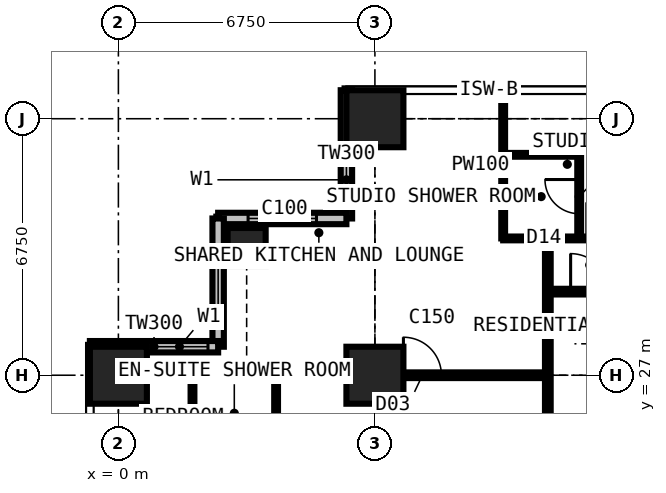
"""IFC4 building model, lengths in metres.
Left out: names, types, materials, properties, quantities, classifications, styles, units other than length and angle.
Written with IfcOpenShell. Run it as: python <this file> out.ifc"""

import sys

from ifc_helpers import new_model, si_unit, direction, frame, frame_2d, origin, origin_2d, place, context, subcontext, project, spatial, rectangle, extrude, element, fill, save


model = new_model("IFC4")
c1 = context("Model", 3, precision=1e-05, world=origin(), true_north=direction((0.0, 1.0)))
c2 = subcontext(c1, "Body", "Model", "MODEL_VIEW")
j1 = project(units=[si_unit("LENGTHUNIT", "METRE"), si_unit("PLANEANGLEUNIT", "RADIAN")], contexts=[c1])
p1 = place(None, origin())
s1 = spatial("IfcSite", under=j1, at=p1, CompositionType="ELEMENT")
p2 = place(p1, origin())
s2 = spatial("IfcBuilding", under=s1, at=p2, CompositionType="ELEMENT")
p3 = place(p2, frame((0.0, 0.0, 116.1)))
s3 = spatial("IfcBuildingStorey", under=s2, at=p3, CompositionType="ELEMENT", Elevation=116.1)
p4 = place(p3, frame((0.0, 27.0, 0.0), z_axis=(0.0, 0.0, 1.0), x_axis=(1.0, 0.0, 0.0)))
e1 = element("IfcColumn", 1, at=p4, inside=s3, PredefinedType="COLUMN", context=c2, shape_type="SweptSolid", body=[
    extrude(rectangle(XDim=1.5, YDim=1.5, at=origin_2d()), origin(), (0.0, 0.0, 1.0), 3.6),
])
p5 = place(p3, frame((3.375, 30.375, 0.0), z_axis=(0.0, 0.0, 1.0), x_axis=(1.0, 0.0, 0.0)))
e2 = element("IfcColumn", 2, at=p5, inside=s3, PredefinedType="COLUMN", context=c2, shape_type="SweptSolid", body=[
    extrude(rectangle(XDim=1.0, YDim=1.0, at=origin_2d()), origin(), (0.0, 0.0, 1.0), 3.6),
])
for number, where, z_axis, x_axis in (
    (3, (6.75, 27.0, 0.0), (0.0, 0.0, 1.0), (1.0, 0.0, 0.0)),
    (4, (6.75, 33.75, 0.0), (0.0, 0.0, 1.0), (1.0, 0.0, 0.0)),
):
    element("IfcColumn", number, at=place(p3, frame(where, z_axis=z_axis, x_axis=x_axis)), inside=s3, PredefinedType="COLUMN", context=c2, shape_type="SweptSolid", body=[
        extrude(rectangle(XDim=1.5, YDim=1.5, at=origin_2d()), origin(), (0.0, 0.0, 1.0), 3.6),
    ])
p6 = place(p3, frame((6.0, 34.5, 0.0), z_axis=(0.0, 0.0, 1.0), x_axis=(0.0, -1.0, 0.0)))
e5 = element("IfcWall", 5, at=p6, inside=s3, PredefinedType="SOLIDWALL", context=c2, shape_type="SweptSolid", body=[
    extrude(rectangle(XDim=3.375, YDim=0.3, at=frame_2d((1.688, 0.0))), origin(), (0.0, 0.0, 1.0), 3.375),
])
p7 = place(p6, frame((1.607, 0.0, 0.9)))
e6 = element("IfcOpeningElement", 6, at=p7, cuts=e5, PredefinedType="OPENING", context=c2, shape_type="SweptSolid", body=[
    extrude(rectangle(XDim=1.5, YDim=1.8, at=frame_2d((0.75, 0.9))), frame((0.0, 0.16, 0.0), z_axis=(0.0, -1.0, 0.0), x_axis=(1.0, 0.0, 0.0)), (0.0, 0.0, 1.0), 0.32),
])
p8 = place(p3, frame((6.0, 31.125, 0.0), z_axis=(0.0, 0.0, 1.0), x_axis=(-1.0, 0.0, 0.0)))
e7 = element("IfcWall", 7, at=p8, inside=s3, PredefinedType="SOLIDWALL", context=c2, shape_type="SweptSolid", body=[
    extrude(rectangle(XDim=3.375, YDim=0.3, at=frame_2d((1.688, 0.0))), origin(), (0.0, 0.0, 1.0), 3.375),
])
p9 = place(p8, frame((0.788, 0.0, 0.6)))
e8 = element("IfcOpeningElement", 8, at=p9, cuts=e7, PredefinedType="OPENING", context=c2, shape_type="SweptSolid", body=[
    extrude(rectangle(XDim=1.8, YDim=2.1, at=frame_2d((0.9, 1.05))), frame((0.0, 0.16, 0.0), z_axis=(0.0, -1.0, 0.0), x_axis=(1.0, 0.0, 0.0)), (0.0, 0.0, 1.0), 0.32),
])
p10 = place(p3, frame((2.625, 31.125, 0.0), z_axis=(0.0, 0.0, 1.0), x_axis=(0.0, -1.0, 0.0)))
e9 = element("IfcWall", 9, at=p10, inside=s3, PredefinedType="SOLIDWALL", context=c2, shape_type="SweptSolid", body=[
    extrude(rectangle(XDim=3.375, YDim=0.3, at=frame_2d((1.688, 0.0))), origin(), (0.0, 0.0, 1.0), 3.375),
])
p11 = place(p10, frame((0.788, 0.0, 0.6)))
e10 = element("IfcOpeningElement", 10, at=p11, cuts=e9, PredefinedType="OPENING", context=c2, shape_type="SweptSolid", body=[
    extrude(rectangle(XDim=1.8, YDim=2.1, at=frame_2d((0.9, 1.05))), frame((0.0, 0.16, 0.0), z_axis=(0.0, -1.0, 0.0), x_axis=(1.0, 0.0, 0.0)), (0.0, 0.0, 1.0), 0.32),
])
p12 = place(p3, frame((2.625, 27.75, 0.0), z_axis=(0.0, 0.0, 1.0), x_axis=(-1.0, 0.0, 0.0)))
e11 = element("IfcWall", 11, at=p12, inside=s3, PredefinedType="SOLIDWALL", context=c2, shape_type="SweptSolid", body=[
    extrude(rectangle(XDim=3.375, YDim=0.3, at=frame_2d((1.688, 0.0))), origin(), (0.0, 0.0, 1.0), 3.375),
])
p13 = place(p12, frame((0.268, 0.0, 0.9)))
e12 = element("IfcOpeningElement", 12, at=p13, cuts=e11, PredefinedType="OPENING", context=c2, shape_type="SweptSolid", body=[
    extrude(rectangle(XDim=1.5, YDim=1.8, at=frame_2d((0.75, 0.9))), frame((0.0, 0.16, 0.0), z_axis=(0.0, -1.0, 0.0), x_axis=(1.0, 0.0, 0.0)), (0.0, 0.0, 1.0), 0.32),
])
p14 = place(p3, frame((-0.734, 27.0, 0.0), z_axis=(0.0, 0.0, 1.0), x_axis=(1.0, 0.0, 0.0)))
e13 = element("IfcWall", 13, at=p14, inside=s3, PredefinedType="PARTITIONING", context=c2, shape_type="SweptSolid", body=[
    extrude(rectangle(XDim=12.034, YDim=0.15, at=frame_2d((6.017, 0.0))), origin(), (0.0, 0.0, 1.0), 2.806),
])
p15 = place(p14, frame((8.234, 0.0, 0.0)))
e14 = element("IfcOpeningElement", 14, at=p15, cuts=e13, PredefinedType="OPENING", context=c2, shape_type="SweptSolid", body=[
    extrude(rectangle(XDim=1.0, YDim=2.2, at=frame_2d((0.5, 1.1))), frame((0.0, 0.085, 0.0), z_axis=(0.0, -1.0, 0.0), x_axis=(1.0, 0.0, 0.0)), (0.0, 0.0, 1.0), 0.17),
])
p16 = place(p3, frame((1.95, 25.0, 0.0), z_axis=(0.0, 0.0, 1.0), x_axis=(0.0, 1.0, 0.0)))
e15 = element("IfcWall", 15, at=p16, inside=s3, PredefinedType="PARTITIONING", context=c2, shape_type="SweptSolid", body=[
    extrude(rectangle(XDim=2.0, YDim=0.1, at=frame_2d((1.0, 0.0))), origin(), (0.0, 0.0, 1.0), 3.375),
])
p17 = place(p3, frame((4.15, 10.125, 0.0), z_axis=(0.0, 0.0, 1.0), x_axis=(0.0, 1.0, 0.0)))
e16 = element("IfcWall", 16, at=p17, inside=s3, PredefinedType="PARTITIONING", context=c2, shape_type="SweptSolid", body=[
    extrude(rectangle(XDim=16.875, YDim=0.1, at=frame_2d((8.438, 0.0))), origin(), (0.0, 0.0, 1.0), 3.375),
])
p18 = place(p17, frame((13.7, 0.0, 0.0)))
e17 = element("IfcOpeningElement", 17, at=p18, cuts=e16, PredefinedType="OPENING", context=c2, shape_type="SweptSolid", body=[
    extrude(rectangle(XDim=0.95, YDim=2.2, at=frame_2d((0.475, 1.1))), frame((0.0, 0.06, 0.0), z_axis=(0.0, -1.0, 0.0), x_axis=(1.0, 0.0, 0.0)), (0.0, 0.0, 1.0), 0.12),
])
p19 = place(p17, frame((4.2, 0.0, 0.0)))
e18 = element("IfcOpeningElement", 18, at=p19, cuts=e16, PredefinedType="OPENING", context=c2, shape_type="SweptSolid", body=[
    extrude(rectangle(XDim=0.95, YDim=2.2, at=frame_2d((0.475, 1.1))), frame((0.0, 0.06, 0.0), z_axis=(0.0, -1.0, 0.0), x_axis=(1.0, 0.0, 0.0)), (0.0, 0.0, 1.0), 0.12),
])
p20 = place(p17, frame((10.95, 0.0, 0.0)))
e19 = element("IfcOpeningElement", 19, at=p20, cuts=e16, PredefinedType="OPENING", context=c2, shape_type="SweptSolid", body=[
    extrude(rectangle(XDim=0.95, YDim=2.2, at=frame_2d((0.475, 1.1))), frame((0.0, 0.06, 0.0), z_axis=(0.0, -1.0, 0.0), x_axis=(1.0, 0.0, 0.0)), (0.0, 0.0, 1.0), 0.12),
])
p21 = place(p3, frame((10.125, 30.6, 0.0), z_axis=(0.0, 0.0, 1.0), x_axis=(0.0, 1.0, 0.0)))
e20 = element("IfcWall", 20, at=p21, inside=s3, PredefinedType="PARTITIONING", context=c2, shape_type="SweptSolid", body=[
    extrude(rectangle(XDim=3.884, YDim=0.1, at=frame_2d((1.942, 0.0))), origin(), (0.0, 0.0, 1.0), 3.375),
])
p22 = place(p3, frame((10.125, 30.6, 0.0), z_axis=(0.0, 0.0, 1.0), x_axis=(1.0, 0.0, 0.0)))
e21 = element("IfcWall", 21, at=p22, inside=s3, PredefinedType="PARTITIONING", context=c2, shape_type="SweptSolid", body=[
    extrude(rectangle(XDim=3.375, YDim=0.1, at=frame_2d((1.688, 0.0))), origin(), (0.0, 0.0, 1.0), 3.375),
])
p23 = place(p22, frame((2.2, 0.0, 0.0)))
e22 = element("IfcOpeningElement", 22, at=p23, cuts=e21, PredefinedType="OPENING", context=c2, shape_type="SweptSolid", body=[
    extrude(rectangle(XDim=0.95, YDim=2.2, at=frame_2d((0.475, 1.1))), frame((0.0, 0.06, 0.0), z_axis=(0.0, -1.0, 0.0), x_axis=(1.0, 0.0, 0.0)), (0.0, 0.0, 1.0), 0.12),
])
p24 = place(p3, frame((10.125, 32.8, 0.0), z_axis=(0.0, 0.0, 1.0), x_axis=(1.0, 0.0, 0.0)))
e23 = element("IfcWall", 23, at=p24, inside=s3, PredefinedType="PARTITIONING", context=c2, shape_type="SweptSolid", body=[
    extrude(rectangle(XDim=2.0, YDim=0.1, at=frame_2d((1.0, 0.0))), origin(), (0.0, 0.0, 1.0), 3.375),
])
p25 = place(p3, frame((11.3, 11.3, 0.0), z_axis=(0.0, 0.0, 1.0), x_axis=(0.0, 1.0, 0.0)))
e24 = element("IfcWall", 24, at=p25, inside=s3, PredefinedType="PARTITIONING", context=c2, shape_type="SweptSolid", body=[
    extrude(rectangle(XDim=19.3, YDim=0.15, at=frame_2d((9.65, 0.0))), origin(), (0.0, 0.0, 1.0), 3.375),
])
p26 = place(p25, frame((13.525, 0.0, 0.0)))
e25 = element("IfcOpeningElement", 25, at=p26, cuts=e24, PredefinedType="OPENING", context=c2, shape_type="SweptSolid", body=[
    extrude(rectangle(XDim=1.0, YDim=2.2, at=frame_2d((0.5, 1.1))), frame((0.0, 0.085, 0.0), z_axis=(0.0, -1.0, 0.0), x_axis=(1.0, 0.0, 0.0)), (0.0, 0.0, 1.0), 0.17),
])
p27 = place(p25, frame((10.438, 0.0, 0.0)))
e26 = element("IfcOpeningElement", 26, at=p27, cuts=e24, PredefinedType="OPENING", context=c2, shape_type="SweptSolid", body=[
    extrude(rectangle(XDim=1.0, YDim=2.2, at=frame_2d((0.5, 1.1))), frame((0.0, 0.085, 0.0), z_axis=(0.0, -1.0, 0.0), x_axis=(1.0, 0.0, 0.0)), (0.0, 0.0, 1.0), 0.17),
])
p28 = place(p3, frame((11.3, 29.2, 0.0), z_axis=(0.0, 0.0, 1.0), x_axis=(1.0, 0.0, 0.0)))
e27 = element("IfcWall", 27, at=p28, inside=s3, PredefinedType="PARTITIONING", context=c2, shape_type="SweptSolid", body=[
    extrude(rectangle(XDim=19.075, YDim=0.15, at=frame_2d((9.538, 0.0))), origin(), (0.0, 0.0, 1.0), 3.375),
])
p29 = place(p28, frame((5.825, 0.0, 0.0)))
e28 = element("IfcOpeningElement", 28, at=p29, cuts=e27, PredefinedType="OPENING", context=c2, shape_type="SweptSolid", body=[
    extrude(rectangle(XDim=0.95, YDim=2.2, at=frame_2d((0.475, 1.1))), frame((0.0, 0.085, 0.0), z_axis=(0.0, -1.0, 0.0), x_axis=(1.0, 0.0, 0.0)), (0.0, 0.0, 1.0), 0.17),
])
p30 = place(p28, frame((9.2, 0.0, 0.0)))
e29 = element("IfcOpeningElement", 29, at=p30, cuts=e27, PredefinedType="OPENING", context=c2, shape_type="SweptSolid", body=[
    extrude(rectangle(XDim=0.95, YDim=2.2, at=frame_2d((0.475, 1.1))), frame((0.0, 0.085, 0.0), z_axis=(0.0, -1.0, 0.0), x_axis=(1.0, 0.0, 0.0)), (0.0, 0.0, 1.0), 0.17),
])
p31 = place(p28, frame((0.6, 0.0, 0.0)))
e30 = element("IfcOpeningElement", 30, at=p31, cuts=e27, PredefinedType="OPENING", context=c2, shape_type="SweptSolid", body=[
    extrude(rectangle(XDim=1.0, YDim=2.2, at=frame_2d((0.5, 1.1))), frame((0.0, 0.085, 0.0), z_axis=(0.0, -1.0, 0.0), x_axis=(1.0, 0.0, 0.0)), (0.0, 0.0, 1.0), 0.17),
])
p32 = place(p3, frame((12.125, 30.6, 0.0), z_axis=(0.0, 0.0, 1.0), x_axis=(0.0, 1.0, 0.0)))
e31 = element("IfcWall", 31, at=p32, inside=s3, PredefinedType="PARTITIONING", context=c2, shape_type="SweptSolid", body=[
    extrude(rectangle(XDim=2.2, YDim=0.1, at=frame_2d((1.1, 0.0))), origin(), (0.0, 0.0, 1.0), 3.375),
])
p33 = place(p32, frame((0.65, 0.0, 0.0)))
e32 = element("IfcOpeningElement", 32, at=p33, cuts=e31, PredefinedType="OPENING", context=c2, shape_type="SweptSolid", body=[
    extrude(rectangle(XDim=0.9, YDim=2.2, at=frame_2d((0.45, 1.1))), frame((0.0, 0.06, 0.0), z_axis=(0.0, -1.0, 0.0), x_axis=(1.0, 0.0, 0.0)), (0.0, 0.0, 1.0), 0.12),
])
p34 = place(p7, origin())
e33 = element("IfcWindow", 33, at=p34, inside=s3, PartitioningType="SINGLE_PANEL", PredefinedType="WINDOW", context=c2, shape_type="SweptSolid", body=[
    extrude(rectangle(XDim=1.5, YDim=1.8, at=frame_2d((0.75, 0.9))), frame((0.0, 0.03, 0.0), z_axis=(0.0, -1.0, 0.0), x_axis=(1.0, 0.0, 0.0)), (0.0, 0.0, 1.0), 0.06),
])
fill(e6, e33)
p35 = place(p9, origin())
e34 = element("IfcWindow", 34, at=p35, inside=s3, PartitioningType="SINGLE_PANEL", PredefinedType="WINDOW", context=c2, shape_type="SweptSolid", body=[
    extrude(rectangle(XDim=1.8, YDim=2.1, at=frame_2d((0.9, 1.05))), frame((0.0, 0.03, 0.0), z_axis=(0.0, -1.0, 0.0), x_axis=(1.0, 0.0, 0.0)), (0.0, 0.0, 1.0), 0.06),
])
fill(e8, e34)
p36 = place(p11, origin())
e35 = element("IfcWindow", 35, at=p36, inside=s3, PartitioningType="SINGLE_PANEL", PredefinedType="WINDOW", context=c2, shape_type="SweptSolid", body=[
    extrude(rectangle(XDim=1.8, YDim=2.1, at=frame_2d((0.9, 1.05))), frame((0.0, 0.03, 0.0), z_axis=(0.0, -1.0, 0.0), x_axis=(1.0, 0.0, 0.0)), (0.0, 0.0, 1.0), 0.06),
])
fill(e10, e35)
p37 = place(p13, origin())
e36 = element("IfcWindow", 36, at=p37, inside=s3, PartitioningType="SINGLE_PANEL", PredefinedType="WINDOW", context=c2, shape_type="SweptSolid", body=[
    extrude(rectangle(XDim=1.5, YDim=1.8, at=frame_2d((0.75, 0.9))), frame((0.0, 0.03, 0.0), z_axis=(0.0, -1.0, 0.0), x_axis=(1.0, 0.0, 0.0)), (0.0, 0.0, 1.0), 0.06),
])
fill(e12, e36)
p38 = place(p33, origin())
e37 = element("IfcDoor", 37, at=p38, inside=s3, OperationType="SINGLE_SWING_RIGHT", PredefinedType="DOOR", context=c2, shape_type="SweptSolid", body=[
    extrude(rectangle(XDim=0.9, YDim=2.2, at=frame_2d((0.45, 1.1))), frame((0.0, 0.025, 0.0), z_axis=(0.0, -1.0, 0.0), x_axis=(1.0, 0.0, 0.0)), (0.0, 0.0, 1.0), 0.05),
])
fill(e32, e37)
p39 = place(p31, origin())
e38 = element("IfcDoor", 38, at=p39, inside=s3, OperationType="SINGLE_SWING_LEFT", PredefinedType="DOOR", context=c2, shape_type="SweptSolid", body=[
    extrude(rectangle(XDim=1.0, YDim=2.2, at=frame_2d((0.5, 1.1))), frame((0.0, 0.025, 0.0), z_axis=(0.0, -1.0, 0.0), x_axis=(1.0, 0.0, 0.0)), (0.0, 0.0, 1.0), 0.05),
])
fill(e30, e38)
p40 = place(p15, origin())
e39 = element("IfcDoor", 39, at=p40, inside=s3, OperationType="SINGLE_SWING_LEFT", PredefinedType="DOOR", context=c2, shape_type="SweptSolid", body=[
    extrude(rectangle(XDim=1.0, YDim=2.2, at=frame_2d((0.5, 1.1))), frame((0.0, 0.025, 0.0), z_axis=(0.0, -1.0, 0.0), x_axis=(1.0, 0.0, 0.0)), (0.0, 0.0, 1.0), 0.05),
])
fill(e14, e39)
save(model, sys.argv[1])
